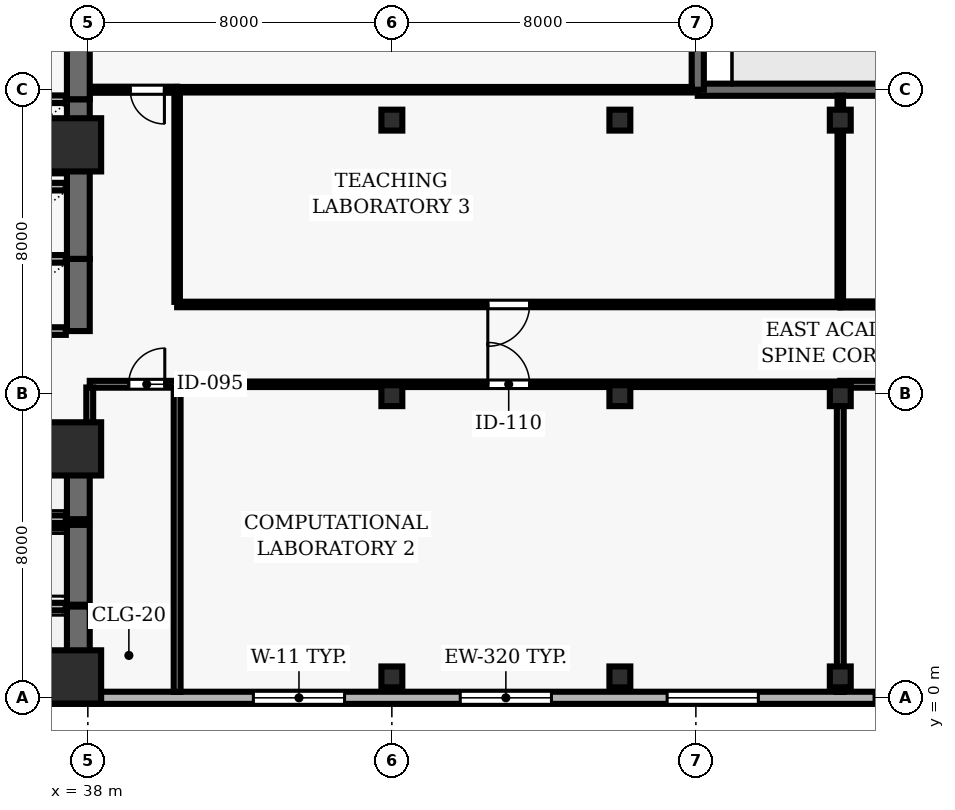
"""IFC4 building model, lengths in metres.
Left out: names, types, materials, properties, quantities, classifications, styles, units other than length and angle.
Written with IfcOpenShell. Run it as: python <this file> out.ifc"""

import sys

from ifc_helpers import new_model, si_unit, direction, frame, frame_2d, origin, origin_2d, place, context, subcontext, project, spatial, rectangle, hollow_rectangle, extrude, element, fill, save


model = new_model("IFC4")
c1 = context("Model", 3, precision=1e-05, world=origin(), true_north=direction((0.0, 1.0)))
c2 = subcontext(c1, "Body", "Model", "MODEL_VIEW")
j1 = project(units=[si_unit("LENGTHUNIT", "METRE"), si_unit("PLANEANGLEUNIT", "RADIAN")], contexts=[c1])
p1 = place(None, origin())
s1 = spatial("IfcSite", under=j1, at=p1, CompositionType="ELEMENT")
p2 = place(p1, origin())
s2 = spatial("IfcBuilding", under=s1, at=p2, CompositionType="ELEMENT")
p3 = place(p2, frame((0.0, 0.0, 46.6)))
s3 = spatial("IfcBuildingStorey", under=s2, at=p3, CompositionType="ELEMENT", Elevation=46.6)
for number, where, z_axis, x_axis in (
    (1, (37.65, 0.55, 0.0), (0.0, 0.0, 1.0), (1.0, 0.0, 0.0)),
    (2, (37.65, 6.55, 0.0), (0.0, 0.0, 1.0), (1.0, 0.0, 0.0)),
    (3, (37.65, 14.55, 0.0), (0.0, 0.0, 1.0), (1.0, 0.0, 0.0)),
):
    element("IfcColumn", number, at=place(p3, frame(where, z_axis=z_axis, x_axis=x_axis)), inside=s3, PredefinedType="COLUMN", context=c2, shape_type="SweptSolid", body=[
        extrude(rectangle(XDim=1.4, YDim=1.4, at=origin_2d()), origin(), (0.0, 0.0, 1.0), 3.9),
    ])
for number, where, z_axis, x_axis in (
    (4, (46.0, 0.55, 0.0), (0.0, 0.0, 1.0), (1.0, 0.0, 0.0)),
    (5, (46.0, 7.95, 0.0), (0.0, 0.0, 1.0), (1.0, 0.0, 0.0)),
    (6, (46.0, 15.2, 0.0), (0.0, 0.0, 1.0), (1.0, 0.0, 0.0)),
    (7, (52.0, 0.55, 0.0), (0.0, 0.0, 1.0), (1.0, 0.0, 0.0)),
    (8, (52.0, 7.95, 0.0), (0.0, 0.0, 1.0), (1.0, 0.0, 0.0)),
    (9, (52.0, 15.2, 0.0), (0.0, 0.0, 1.0), (1.0, 0.0, 0.0)),
    (10, (57.8, 0.55, 0.0), (0.0, 0.0, 1.0), (1.0, 0.0, 0.0)),
    (11, (57.8, 7.95, 0.0), (0.0, 0.0, 1.0), (1.0, 0.0, 0.0)),
    (12, (57.8, 15.2, 0.0), (0.0, 0.0, 1.0), (1.0, 0.0, 0.0)),
):
    element("IfcColumn", number, at=place(p3, frame(where, z_axis=z_axis, x_axis=x_axis)), inside=s3, PredefinedType="COLUMN", context=c2, shape_type="SweptSolid", body=[
        extrude(hollow_rectangle(XDim=0.55, YDim=0.55, WallThickness=0.025, at=origin_2d()), origin(), (0.0, 0.0, 1.0), 3.9),
    ])
p4 = place(p3, frame((24.5, 0.0, 0.0), z_axis=(0.0, 0.0, 1.0), x_axis=(1.0, 0.0, 0.0)))
e13 = element("IfcWall", 13, at=p4, inside=s3, PredefinedType="SOLIDWALL", context=c2, shape_type="SweptSolid", body=[
    extrude(rectangle(XDim=49.0, YDim=0.32, at=frame_2d((24.5, 0.0))), origin(), (0.0, 0.0, 1.0), 3.69),
])
p5 = place(p4, frame((1.522, 0.0, 0.9)))
e14 = element("IfcOpeningElement", 14, at=p5, cuts=e13, PredefinedType="OPENING", context=c2, shape_type="SweptSolid", body=[
    extrude(rectangle(XDim=2.4, YDim=2.2, at=frame_2d((1.2, 1.1))), frame((0.0, 0.17, 0.0), z_axis=(0.0, -1.0, 0.0), x_axis=(1.0, 0.0, 0.0)), (0.0, 0.0, 1.0), 0.34),
])
p6 = place(p4, frame((17.856, 0.0, 0.9)))
e15 = element("IfcOpeningElement", 15, at=p6, cuts=e13, PredefinedType="OPENING", context=c2, shape_type="SweptSolid", body=[
    extrude(rectangle(XDim=2.4, YDim=2.2, at=frame_2d((1.2, 1.1))), frame((0.0, 0.17, 0.0), z_axis=(0.0, -1.0, 0.0), x_axis=(1.0, 0.0, 0.0)), (0.0, 0.0, 1.0), 0.34),
])
p7 = place(p4, frame((23.3, 0.0, 0.9)))
e16 = element("IfcOpeningElement", 16, at=p7, cuts=e13, PredefinedType="OPENING", context=c2, shape_type="SweptSolid", body=[
    extrude(rectangle(XDim=2.4, YDim=2.2, at=frame_2d((1.2, 1.1))), frame((0.0, 0.17, 0.0), z_axis=(0.0, -1.0, 0.0), x_axis=(1.0, 0.0, 0.0)), (0.0, 0.0, 1.0), 0.34),
])
p8 = place(p4, frame((28.744, 0.0, 0.9)))
e17 = element("IfcOpeningElement", 17, at=p8, cuts=e13, PredefinedType="OPENING", context=c2, shape_type="SweptSolid", body=[
    extrude(rectangle(XDim=2.4, YDim=2.2, at=frame_2d((1.2, 1.1))), frame((0.0, 0.17, 0.0), z_axis=(0.0, -1.0, 0.0), x_axis=(1.0, 0.0, 0.0)), (0.0, 0.0, 1.0), 0.34),
])
p9 = place(p4, frame((34.189, 0.0, 0.9)))
e18 = element("IfcOpeningElement", 18, at=p9, cuts=e13, PredefinedType="OPENING", context=c2, shape_type="SweptSolid", body=[
    extrude(rectangle(XDim=2.4, YDim=2.2, at=frame_2d((1.2, 1.1))), frame((0.0, 0.17, 0.0), z_axis=(0.0, -1.0, 0.0), x_axis=(1.0, 0.0, 0.0)), (0.0, 0.0, 1.0), 0.34),
])
p10 = place(p4, frame((39.633, 0.0, 0.9)))
e19 = element("IfcOpeningElement", 19, at=p10, cuts=e13, PredefinedType="OPENING", context=c2, shape_type="SweptSolid", body=[
    extrude(rectangle(XDim=2.4, YDim=2.2, at=frame_2d((1.2, 1.1))), frame((0.0, 0.17, 0.0), z_axis=(0.0, -1.0, 0.0), x_axis=(1.0, 0.0, 0.0)), (0.0, 0.0, 1.0), 0.34),
])
p11 = place(p4, frame((45.078, 0.0, 0.9)))
e20 = element("IfcOpeningElement", 20, at=p11, cuts=e13, PredefinedType="OPENING", context=c2, shape_type="SweptSolid", body=[
    extrude(rectangle(XDim=2.4, YDim=2.2, at=frame_2d((1.2, 1.1))), frame((0.0, 0.17, 0.0), z_axis=(0.0, -1.0, 0.0), x_axis=(1.0, 0.0, 0.0)), (0.0, 0.0, 1.0), 0.34),
])
p12 = place(p3, frame((73.5, 16.0, 0.0), z_axis=(0.0, 0.0, 1.0), x_axis=(-1.0, 0.0, 0.0)))
e21 = element("IfcWall", 21, at=p12, inside=s3, PredefinedType="SOLIDWALL", context=c2, shape_type="SweptSolid", body=[
    extrude(rectangle(XDim=19.45, YDim=0.32, at=frame_2d((9.725, 0.0))), origin(), (0.0, 0.0, 1.0), 3.69),
])
p13 = place(p12, frame((6.925, 0.0, 0.0)))
e22 = element("IfcOpeningElement", 22, at=p13, cuts=e21, PredefinedType="OPENING", context=c2, shape_type="SweptSolid", body=[
    extrude(rectangle(XDim=1.0, YDim=2.2, at=frame_2d((0.5, 1.1))), frame((0.0, 0.17, 0.0), z_axis=(0.0, -1.0, 0.0), x_axis=(1.0, 0.0, 0.0)), (0.0, 0.0, 1.0), 0.34),
])
p14 = place(p12, frame((2.342, 0.0, 0.9)))
e23 = element("IfcOpeningElement", 23, at=p14, cuts=e21, PredefinedType="OPENING", context=c2, shape_type="SweptSolid", body=[
    extrude(rectangle(XDim=1.8, YDim=1.6, at=frame_2d((0.9, 0.8))), frame((0.0, 0.17, 0.0), z_axis=(0.0, -1.0, 0.0), x_axis=(1.0, 0.0, 0.0)), (0.0, 0.0, 1.0), 0.34),
])
p15 = place(p3, frame((54.05, 16.0, 0.0), z_axis=(0.0, 0.0, 1.0), x_axis=(0.0, 1.0, 0.0)))
e24 = element("IfcWall", 24, at=p15, inside=s3, PredefinedType="SOLIDWALL", context=c2, shape_type="SweptSolid", body=[
    extrude(rectangle(XDim=10.747, YDim=0.32, at=frame_2d((5.374, 0.0))), origin(), (0.0, 0.0, 1.0), 3.69),
])
p16 = place(p15, frame((4.324, 0.0, 0.9)))
e25 = element("IfcOpeningElement", 25, at=p16, cuts=e24, PredefinedType="OPENING", context=c2, shape_type="SweptSolid", body=[
    extrude(rectangle(XDim=2.1, YDim=1.6, at=frame_2d((1.05, 0.8))), frame((0.0, 0.17, 0.0), z_axis=(0.0, -1.0, 0.0), x_axis=(1.0, 0.0, 0.0)), (0.0, 0.0, 1.0), 0.34),
])
p17 = place(p3, frame((37.75, 0.3, 0.0), z_axis=(0.0, 0.0, 1.0), x_axis=(0.0, 1.0, 0.0)))
e26 = element("IfcWall", 26, at=p17, inside=s3, PredefinedType="SHEAR", context=c2, shape_type="SweptSolid", body=[
    extrude(rectangle(XDim=2.1, YDim=0.6, at=frame_2d((1.05, 0.0))), origin(), (0.0, 0.0, 1.0), 3.69),
])
for number, where, z_axis, x_axis in (
    (27, (35.28, 0.3, 0.0), (0.0, 0.0, 1.0), (1.0, 0.0, 0.0)),
    (28, (37.42, 2.4, 0.0), (0.0, 0.0, 1.0), (-1.0, 0.0, 0.0)),
):
    element("IfcWall", number, at=place(p3, frame(where, z_axis=z_axis, x_axis=x_axis)), inside=s3, PredefinedType="SOLIDWALL", context=c2, shape_type="SweptSolid", body=[
        extrude(rectangle(XDim=2.14, YDim=0.2, at=frame_2d((1.07, 0.0))), origin(), (0.0, 0.0, 1.0), 3.69),
    ])
p18 = place(p3, frame((37.75, 2.45, 0.0), z_axis=(0.0, 0.0, 1.0), x_axis=(0.0, 1.0, 0.0)))
e29 = element("IfcWall", 29, at=p18, inside=s3, PredefinedType="SHEAR", context=c2, shape_type="SweptSolid", body=[
    extrude(rectangle(XDim=2.1, YDim=0.6, at=frame_2d((1.05, 0.0))), origin(), (0.0, 0.0, 1.0), 3.69),
])
p19 = place(p3, frame((37.42, 4.55, 0.0), z_axis=(0.0, 0.0, 1.0), x_axis=(-1.0, 0.0, 0.0)))
e30 = element("IfcWall", 30, at=p19, inside=s3, PredefinedType="SOLIDWALL", context=c2, shape_type="SweptSolid", body=[
    extrude(rectangle(XDim=2.14, YDim=0.2, at=frame_2d((1.07, 0.0))), origin(), (0.0, 0.0, 1.0), 3.69),
])
p20 = place(p3, frame((37.75, 4.7, 0.0), z_axis=(0.0, 0.0, 1.0), x_axis=(0.0, 1.0, 0.0)))
e31 = element("IfcWall", 31, at=p20, inside=s3, PredefinedType="SHEAR", context=c2, shape_type="SweptSolid", body=[
    extrude(rectangle(XDim=2.25, YDim=0.6, at=frame_2d((1.125, 0.0))), origin(), (0.0, 0.0, 1.0), 3.69),
])
for number, where, z_axis, x_axis in (
    (32, (35.28, 4.7, 0.0), (0.0, 0.0, 1.0), (1.0, 0.0, 0.0)),
    (33, (37.42, 6.95, 0.0), (0.0, 0.0, 1.0), (-1.0, 0.0, 0.0)),
):
    element("IfcWall", number, at=place(p3, frame(where, z_axis=z_axis, x_axis=x_axis)), inside=s3, PredefinedType="SOLIDWALL", context=c2, shape_type="SweptSolid", body=[
        extrude(rectangle(XDim=2.14, YDim=0.2, at=frame_2d((1.07, 0.0))), origin(), (0.0, 0.0, 1.0), 3.69),
    ])
p21 = place(p3, frame((37.75, 9.65, 0.0), z_axis=(0.0, 0.0, 1.0), x_axis=(0.0, 1.0, 0.0)))
e34 = element("IfcWall", 34, at=p21, inside=s3, PredefinedType="SHEAR", context=c2, shape_type="SweptSolid", body=[
    extrude(rectangle(XDim=1.9, YDim=0.6, at=frame_2d((0.95, 0.0))), origin(), (0.0, 0.0, 1.0), 3.69),
])
for number, where, z_axis, x_axis in (
    (35, (35.28, 9.65, 0.0), (0.0, 0.0, 1.0), (1.0, 0.0, 0.0)),
    (36, (37.42, 11.55, 0.0), (0.0, 0.0, 1.0), (-1.0, 0.0, 0.0)),
):
    element("IfcWall", number, at=place(p3, frame(where, z_axis=z_axis, x_axis=x_axis)), inside=s3, PredefinedType="SOLIDWALL", context=c2, shape_type="SweptSolid", body=[
        extrude(rectangle(XDim=2.14, YDim=0.2, at=frame_2d((1.07, 0.0))), origin(), (0.0, 0.0, 1.0), 3.69),
    ])
p22 = place(p3, frame((37.75, 11.55, 0.0), z_axis=(0.0, 0.0, 1.0), x_axis=(0.0, 1.0, 0.0)))
e37 = element("IfcWall", 37, at=p22, inside=s3, PredefinedType="SHEAR", context=c2, shape_type="SweptSolid", body=[
    extrude(rectangle(XDim=2.35, YDim=0.6, at=frame_2d((1.175, 0.0))), origin(), (0.0, 0.0, 1.0), 3.69),
])
p23 = place(p3, frame((37.42, 13.45, 0.0), z_axis=(0.0, 0.0, 1.0), x_axis=(-1.0, 0.0, 0.0)))
e38 = element("IfcWall", 38, at=p23, inside=s3, PredefinedType="SOLIDWALL", context=c2, shape_type="SweptSolid", body=[
    extrude(rectangle(XDim=2.14, YDim=0.2, at=frame_2d((1.07, 0.0))), origin(), (0.0, 0.0, 1.0), 3.69),
])
p24 = place(p3, frame((37.75, 13.9, 0.0), z_axis=(0.0, 0.0, 1.0), x_axis=(0.0, 1.0, 0.0)))
e39 = element("IfcWall", 39, at=p24, inside=s3, PredefinedType="SHEAR", context=c2, shape_type="SweptSolid", body=[
    extrude(rectangle(XDim=1.85, YDim=0.6, at=frame_2d((0.925, 0.0))), origin(), (0.0, 0.0, 1.0), 3.69),
])
for number, where, z_axis, x_axis in (
    (40, (35.28, 13.9, 0.0), (0.0, 0.0, 1.0), (1.0, 0.0, 0.0)),
    (41, (37.42, 15.75, 0.0), (0.0, 0.0, 1.0), (-1.0, 0.0, 0.0)),
):
    element("IfcWall", number, at=place(p3, frame(where, z_axis=z_axis, x_axis=x_axis)), inside=s3, PredefinedType="SOLIDWALL", context=c2, shape_type="SweptSolid", body=[
        extrude(rectangle(XDim=2.14, YDim=0.2, at=frame_2d((1.07, 0.0))), origin(), (0.0, 0.0, 1.0), 3.69),
    ])
p25 = place(p3, frame((37.75, 15.75, 0.0), z_axis=(0.0, 0.0, 1.0), x_axis=(0.0, 1.0, 0.0)))
e42 = element("IfcWall", 42, at=p25, inside=s3, PredefinedType="SHEAR", context=c2, shape_type="SweptSolid", body=[
    extrude(rectangle(XDim=1.85, YDim=0.6, at=frame_2d((0.925, 0.0))), origin(), (0.0, 0.0, 1.0), 3.69),
])
p26 = place(p3, frame((38.05, 8.25, 0.0), z_axis=(0.0, 0.0, 1.0), x_axis=(1.0, 0.0, 0.0)))
e43 = element("IfcWall", 43, at=p26, inside=s3, PredefinedType="PARTITIONING", context=c2, shape_type="SweptSolid", body=[
    extrude(rectangle(XDim=2.3, YDim=0.18, at=frame_2d((1.15, 0.0))), origin(), (0.0, 0.0, 1.0), 2.995),
])
p27 = place(p26, frame((1.025, 0.0, 0.0)))
e44 = element("IfcOpeningElement", 44, at=p27, cuts=e43, PredefinedType="OPENING", context=c2, shape_type="SweptSolid", body=[
    extrude(rectangle(XDim=0.95, YDim=2.1, at=frame_2d((0.475, 1.05))), frame((0.0, 0.1, 0.0), z_axis=(0.0, -1.0, 0.0), x_axis=(1.0, 0.0, 0.0)), (0.0, 0.0, 1.0), 0.2),
])
p28 = place(p3, frame((40.35, 8.25, 0.0), z_axis=(0.0, 0.0, 1.0), x_axis=(1.0, 0.0, 0.0)))
e45 = element("IfcWall", 45, at=p28, inside=s3, PredefinedType="PARTITIONING", context=c2, shape_type="SweptSolid", body=[
    extrude(rectangle(XDim=17.45, YDim=0.145, at=frame_2d((8.725, 0.0))), origin(), (0.0, 0.0, 1.0), 2.995),
])
p29 = place(p28, frame((8.175, 0.0, 0.0)))
e46 = element("IfcOpeningElement", 46, at=p29, cuts=e45, PredefinedType="OPENING", context=c2, shape_type="SweptSolid", body=[
    extrude(rectangle(XDim=1.1, YDim=2.15, at=frame_2d((0.55, 1.075))), frame((0.0, 0.083, 0.0), z_axis=(0.0, -1.0, 0.0), x_axis=(1.0, 0.0, 0.0)), (0.0, 0.0, 1.0), 0.165),
])
p30 = place(p3, frame((40.35, 16.0, 0.0), z_axis=(0.0, 0.0, 1.0), x_axis=(1.0, 0.0, 0.0)))
e47 = element("IfcWall", 47, at=p30, inside=s3, PredefinedType="PARTITIONING", context=c2, shape_type="SweptSolid", body=[
    extrude(rectangle(XDim=13.545, YDim=0.145, at=frame_2d((6.772, 0.0))), origin(), (0.0, 0.0, 1.0), 3.39),
])
p31 = place(p3, frame((40.35, 16.0, 0.0), z_axis=(0.0, 0.0, 1.0), x_axis=(-1.0, 0.0, 0.0)))
e48 = element("IfcWall", 48, at=p31, inside=s3, PredefinedType="PARTITIONING", context=c2, shape_type="SweptSolid", body=[
    extrude(rectangle(XDim=2.27, YDim=0.16, at=frame_2d((1.135, 0.0))), origin(), (0.0, 0.0, 1.0), 3.69),
])
p32 = place(p31, frame((0.335, 0.0, 0.0)))
e49 = element("IfcOpeningElement", 49, at=p32, cuts=e48, PredefinedType="OPENING", context=c2, shape_type="SweptSolid", body=[
    extrude(rectangle(XDim=0.9, YDim=2.1, at=frame_2d((0.45, 1.05))), frame((0.0, 0.09, 0.0), z_axis=(0.0, -1.0, 0.0), x_axis=(1.0, 0.0, 0.0)), (0.0, 0.0, 1.0), 0.18),
])
p33 = place(p3, frame((57.8, 8.25, 0.0), z_axis=(0.0, 0.0, 1.0), x_axis=(1.0, 0.0, 0.0)))
e50 = element("IfcWall", 50, at=p33, inside=s3, PredefinedType="PARTITIONING", context=c2, shape_type="SweptSolid", body=[
    extrude(rectangle(XDim=18.045, YDim=0.18, at=frame_2d((9.022, 0.0))), origin(), (0.0, 0.0, 1.0), 3.69),
])
p34 = place(p33, frame((8.548, 0.0, 0.0)))
e51 = element("IfcOpeningElement", 51, at=p34, cuts=e50, PredefinedType="OPENING", context=c2, shape_type="SweptSolid", body=[
    extrude(rectangle(XDim=0.95, YDim=2.1, at=frame_2d((0.475, 1.05))), frame((0.0, 0.1, 0.0), z_axis=(0.0, -1.0, 0.0), x_axis=(1.0, 0.0, 0.0)), (0.0, 0.0, 1.0), 0.2),
])
p35 = place(p3, frame((57.8, 10.35, 0.0), z_axis=(0.0, 0.0, 1.0), x_axis=(-1.0, 0.0, 0.0)))
e52 = element("IfcWall", 52, at=p35, inside=s3, PredefinedType="PARTITIONING", context=c2, shape_type="SweptSolid", body=[
    extrude(rectangle(XDim=17.45, YDim=0.145, at=frame_2d((8.725, 0.0))), origin(), (0.0, 0.0, 1.0), 3.227),
])
p36 = place(p35, frame((8.175, 0.0, 0.0)))
e53 = element("IfcOpeningElement", 53, at=p36, cuts=e52, PredefinedType="OPENING", context=c2, shape_type="SweptSolid", body=[
    extrude(rectangle(XDim=1.1, YDim=2.15, at=frame_2d((0.55, 1.075))), frame((0.0, 0.083, 0.0), z_axis=(0.0, -1.0, 0.0), x_axis=(1.0, 0.0, 0.0)), (0.0, 0.0, 1.0), 0.165),
])
p37 = place(p3, frame((75.845, 10.35, 0.0), z_axis=(0.0, 0.0, 1.0), x_axis=(-1.0, 0.0, 0.0)))
e54 = element("IfcWall", 54, at=p37, inside=s3, PredefinedType="PARTITIONING", context=c2, shape_type="SweptSolid", body=[
    extrude(rectangle(XDim=18.045, YDim=0.16, at=frame_2d((9.022, 0.0))), origin(), (0.0, 0.0, 1.0), 3.227),
])
p38 = place(p37, frame((8.573, 0.0, 0.0)))
e55 = element("IfcOpeningElement", 55, at=p38, cuts=e54, PredefinedType="OPENING", context=c2, shape_type="SweptSolid", body=[
    extrude(rectangle(XDim=0.9, YDim=2.1, at=frame_2d((0.45, 1.05))), frame((0.0, 0.09, 0.0), z_axis=(0.0, -1.0, 0.0), x_axis=(1.0, 0.0, 0.0)), (0.0, 0.0, 1.0), 0.18),
])
p39 = place(p3, frame((38.05, 7.05, 0.0), z_axis=(0.0, 0.0, 1.0), x_axis=(0.0, 1.0, 0.0)))
e56 = element("IfcWall", 56, at=p39, inside=s3, PredefinedType="PARTITIONING", context=c2, shape_type="SweptSolid", body=[
    extrude(rectangle(XDim=1.115, YDim=0.18, at=frame_2d((0.558, 0.0))), origin(), (0.0, 0.0, 1.0), 2.995),
])
p40 = place(p3, frame((40.35, 0.155, 0.0), z_axis=(0.0, 0.0, 1.0), x_axis=(0.0, 1.0, 0.0)))
e57 = element("IfcWall", 57, at=p40, inside=s3, PredefinedType="PARTITIONING", context=c2, shape_type="SweptSolid", body=[
    extrude(rectangle(XDim=8.01, YDim=0.18, at=frame_2d((4.005, 0.0))), origin(), (0.0, 0.0, 1.0), 3.69),
])
p41 = place(p3, frame((40.35, 10.418, 0.0), z_axis=(0.0, 0.0, 1.0), x_axis=(0.0, 1.0, 0.0)))
e58 = element("IfcWall", 58, at=p41, inside=s3, PredefinedType="PARTITIONING", context=c2, shape_type="SweptSolid", body=[
    extrude(rectangle(XDim=5.507, YDim=0.145, at=frame_2d((2.753, 0.0))), origin(), (0.0, 0.0, 1.0), 3.227),
])
p42 = place(p3, frame((57.8, 0.155, 0.0), z_axis=(0.0, 0.0, 1.0), x_axis=(0.0, 1.0, 0.0)))
e59 = element("IfcWall", 59, at=p42, inside=s3, PredefinedType="PARTITIONING", context=c2, shape_type="SweptSolid", body=[
    extrude(rectangle(XDim=8.01, YDim=0.18, at=frame_2d((4.005, 0.0))), origin(), (0.0, 0.0, 1.0), 2.995),
])
p43 = place(p3, frame((57.8, 10.425, 0.0), z_axis=(0.0, 0.0, 1.0), x_axis=(0.0, 1.0, 0.0)))
e60 = element("IfcWall", 60, at=p43, inside=s3, PredefinedType="PARTITIONING", context=c2, shape_type="SweptSolid", body=[
    extrude(rectangle(XDim=5.42, YDim=0.145, at=frame_2d((2.71, 0.0))), origin(), (0.0, 0.0, 1.0), 2.995),
])
p44 = place(p6, origin())
e61 = element("IfcWindow", 61, at=p44, inside=s3, PartitioningType="SINGLE_PANEL", PredefinedType="WINDOW", context=c2, shape_type="SweptSolid", body=[
    extrude(rectangle(XDim=2.4, YDim=2.2, at=frame_2d((1.2, 1.1))), frame((0.0, 0.03, 0.0), z_axis=(0.0, -1.0, 0.0), x_axis=(1.0, 0.0, 0.0)), (0.0, 0.0, 1.0), 0.06),
])
fill(e15, e61)
p45 = place(p7, origin())
e62 = element("IfcWindow", 62, at=p45, inside=s3, PartitioningType="SINGLE_PANEL", PredefinedType="WINDOW", context=c2, shape_type="SweptSolid", body=[
    extrude(rectangle(XDim=2.4, YDim=2.2, at=frame_2d((1.2, 1.1))), frame((0.0, 0.03, 0.0), z_axis=(0.0, -1.0, 0.0), x_axis=(1.0, 0.0, 0.0)), (0.0, 0.0, 1.0), 0.06),
])
fill(e16, e62)
p46 = place(p8, origin())
e63 = element("IfcWindow", 63, at=p46, inside=s3, PartitioningType="SINGLE_PANEL", PredefinedType="WINDOW", context=c2, shape_type="SweptSolid", body=[
    extrude(rectangle(XDim=2.4, YDim=2.2, at=frame_2d((1.2, 1.1))), frame((0.0, 0.03, 0.0), z_axis=(0.0, -1.0, 0.0), x_axis=(1.0, 0.0, 0.0)), (0.0, 0.0, 1.0), 0.06),
])
fill(e17, e63)
p47 = place(p9, origin())
e64 = element("IfcWindow", 64, at=p47, inside=s3, PartitioningType="SINGLE_PANEL", PredefinedType="WINDOW", context=c2, shape_type="SweptSolid", body=[
    extrude(rectangle(XDim=2.4, YDim=2.2, at=frame_2d((1.2, 1.1))), frame((0.0, 0.03, 0.0), z_axis=(0.0, -1.0, 0.0), x_axis=(1.0, 0.0, 0.0)), (0.0, 0.0, 1.0), 0.06),
])
fill(e18, e64)
p48 = place(p27, origin())
e65 = element("IfcDoor", 65, at=p48, inside=s3, OperationType="SINGLE_SWING_RIGHT", PredefinedType="DOOR", context=c2, shape_type="SweptSolid", body=[
    extrude(rectangle(XDim=0.95, YDim=2.1, at=frame_2d((0.475, 1.05))), frame((0.0, 0.025, 0.0), z_axis=(0.0, -1.0, 0.0), x_axis=(1.0, 0.0, 0.0)), (0.0, 0.0, 1.0), 0.05),
])
fill(e44, e65)
p49 = place(p29, origin())
e66 = element("IfcDoor", 66, at=p49, inside=s3, OperationType="SINGLE_SWING_LEFT", PredefinedType="DOOR", context=c2, shape_type="SweptSolid", body=[
    extrude(rectangle(XDim=1.1, YDim=2.15, at=frame_2d((0.55, 1.075))), frame((0.0, 0.025, 0.0), z_axis=(0.0, -1.0, 0.0), x_axis=(1.0, 0.0, 0.0)), (0.0, 0.0, 1.0), 0.05),
])
fill(e46, e66)
p50 = place(p36, origin())
e67 = element("IfcDoor", 67, at=p50, inside=s3, OperationType="SINGLE_SWING_RIGHT", PredefinedType="DOOR", context=c2, shape_type="SweptSolid", body=[
    extrude(rectangle(XDim=1.1, YDim=2.15, at=frame_2d((0.55, 1.075))), frame((0.0, 0.025, 0.0), z_axis=(0.0, -1.0, 0.0), x_axis=(1.0, 0.0, 0.0)), (0.0, 0.0, 1.0), 0.05),
])
fill(e53, e67)
p51 = place(p32, origin())
e68 = element("IfcDoor", 68, at=p51, inside=s3, OperationType="SINGLE_SWING_LEFT", PredefinedType="DOOR", context=c2, shape_type="SweptSolid", body=[
    extrude(rectangle(XDim=0.9, YDim=2.1, at=frame_2d((0.45, 1.05))), frame((0.0, 0.025, 0.0), z_axis=(0.0, -1.0, 0.0), x_axis=(1.0, 0.0, 0.0)), (0.0, 0.0, 1.0), 0.05),
])
fill(e49, e68)
save(model, sys.argv[1])
